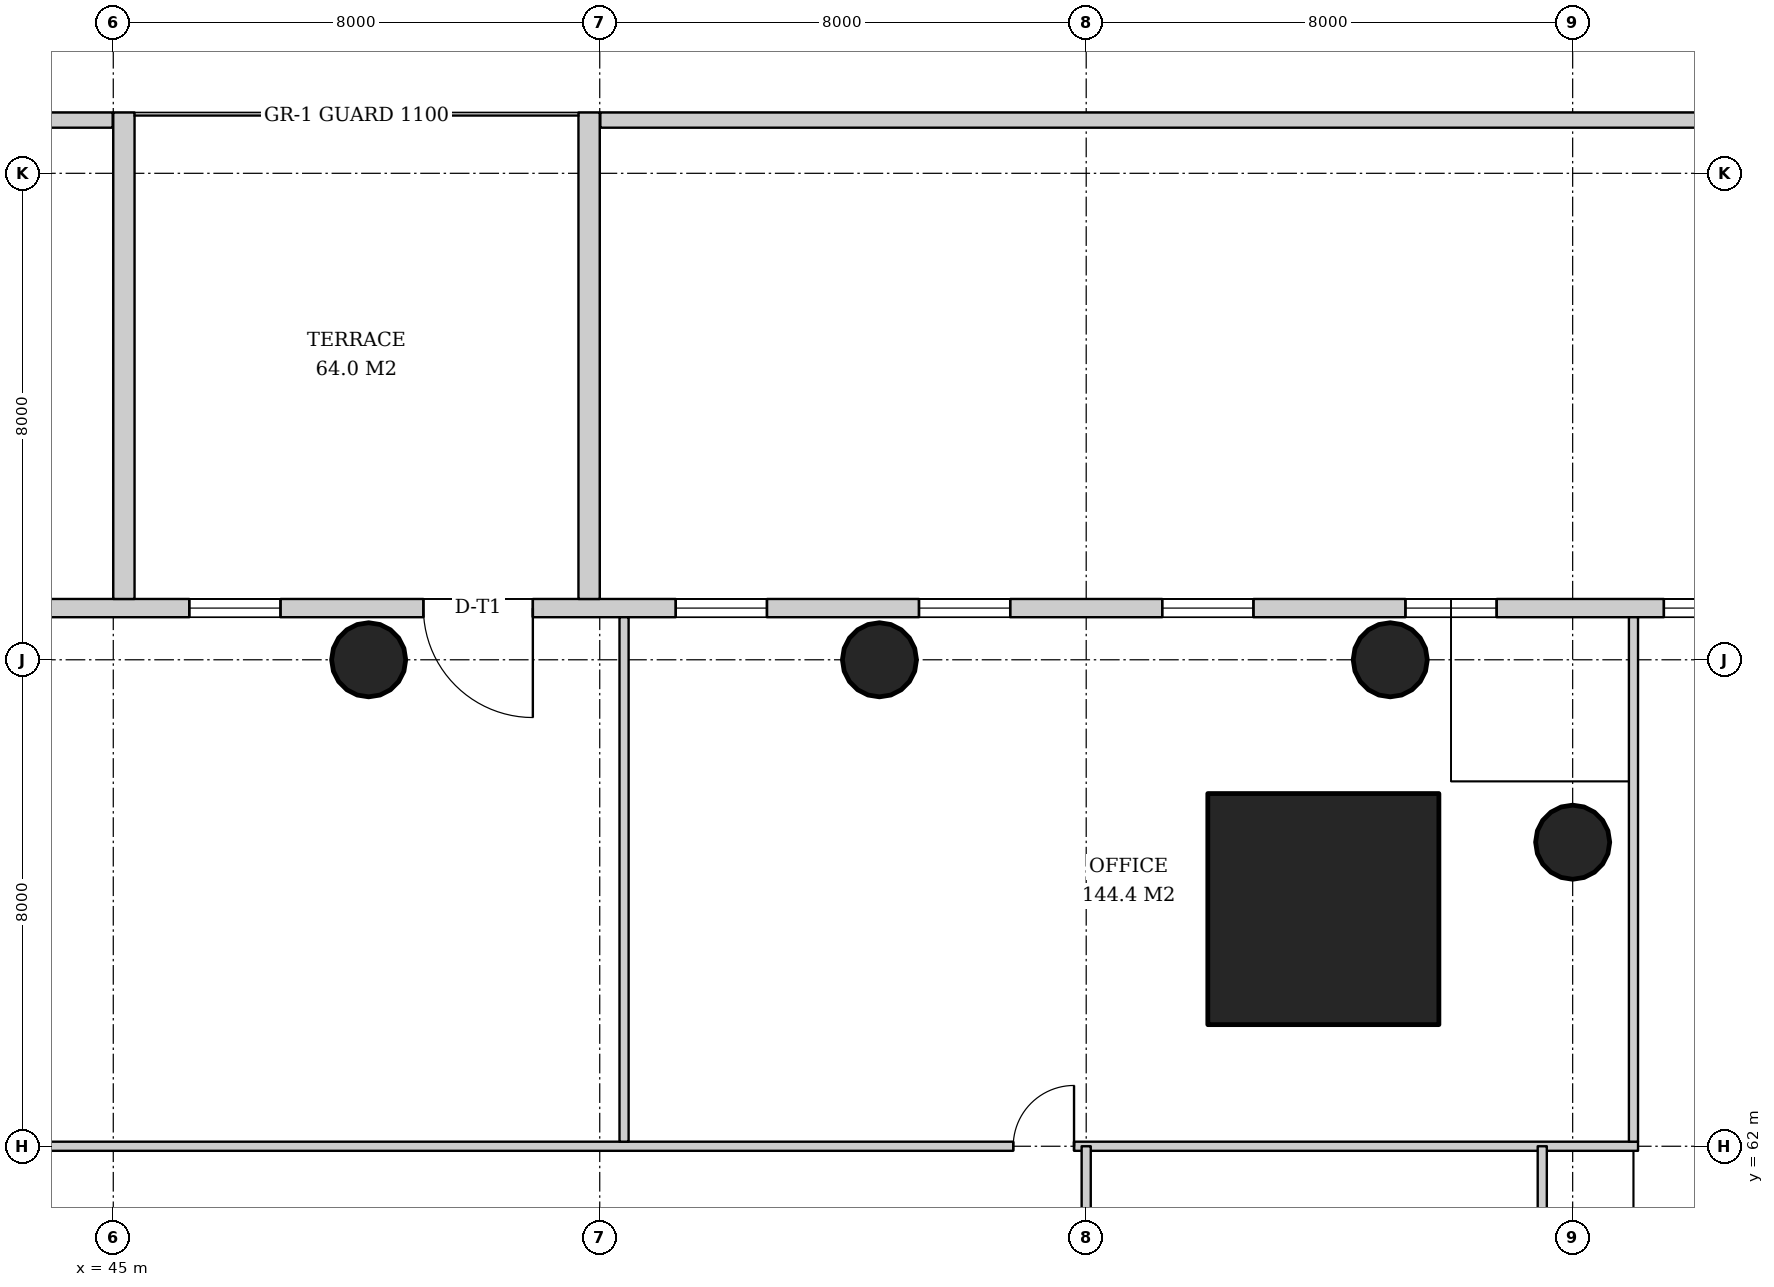
"""IFC4 building model, lengths in metres.
Left out: names, types, materials, properties, quantities, classifications, styles, units other than length and angle.
Written with IfcOpenShell. Run it as: python <this file> out.ifc"""

import sys

from ifc_helpers import new_model, si_unit, direction, frame, frame_2d, origin, origin_2d, place, context, subcontext, project, spatial, rectangle, hollow_circle, extrude, element, fill, save


model = new_model("IFC4")
c1 = context("Model", 3, precision=1e-05, world=origin(), true_north=direction((0.0, 1.0)))
c2 = subcontext(c1, "Body", "Model", "MODEL_VIEW")
j1 = project(units=[si_unit("LENGTHUNIT", "METRE"), si_unit("PLANEANGLEUNIT", "RADIAN")], contexts=[c1])
p1 = place(None, origin())
s1 = spatial("IfcSite", under=j1, at=p1, CompositionType="ELEMENT")
p2 = place(p1, origin())
s2 = spatial("IfcBuilding", under=s1, at=p2, CompositionType="ELEMENT")
p3 = place(p2, frame((0.0, 0.0, 16.0)))
s3 = spatial("IfcBuildingStorey", under=s2, at=p3, CompositionType="ELEMENT", Elevation=16.0)
p4 = place(p3, frame((64.9, 65.9, 0.0), z_axis=(0.0, 0.0, 1.0), x_axis=(1.0, 0.0, 0.0)))
e1 = element("IfcColumn", 1, at=p4, inside=s3, PredefinedType="COLUMN", context=c2, shape_type="SweptSolid", body=[
    extrude(rectangle(XDim=3.8, YDim=3.8, at=origin_2d()), origin(), (0.0, 0.0, 1.0), 5.0),
])
for number, where, z_axis, x_axis in (
    (2, (69.0, 67.0, 0.0), (0.0, 0.0, 1.0), (1.0, 0.0, 0.0)),
    (3, (66.0, 70.0, 0.0), (0.0, 0.0, 1.0), (1.0, 0.0, 0.0)),
    (4, (57.6, 70.0, 0.0), (0.0, 0.0, 1.0), (1.0, 0.0, 0.0)),
    (5, (49.2, 70.0, 0.0), (0.0, 0.0, 1.0), (1.0, 0.0, 0.0)),
):
    element("IfcColumn", number, at=place(p3, frame(where, z_axis=z_axis, x_axis=x_axis)), inside=s3, PredefinedType="COLUMN", context=c2, shape_type="SweptSolid", body=[
        extrude(hollow_circle(Radius=0.61, WallThickness=0.04, at=origin_2d()), origin(), (0.0, 0.0, 1.0), 5.0),
    ])
p5 = place(p3, frame((78.0, 70.85, 0.0), z_axis=(0.0, 0.0, 1.0), x_axis=(-1.0, 0.0, 0.0)))
e6 = element("IfcWall", 6, at=p5, inside=s3, PredefinedType="SOLIDWALL", context=c2, shape_type="SweptSolid", body=[
    extrude(rectangle(XDim=58.0, YDim=0.3, at=frame_2d((29.0, 0.0))), origin(), (0.0, 0.0, 1.0), 4.7),
])
p6 = place(p5, frame((1.5, 0.0, 0.9)))
e7 = element("IfcOpeningElement", 7, at=p6, cuts=e6, PredefinedType="OPENING", context=c2, shape_type="SweptSolid", body=[
    extrude(rectangle(XDim=1.5, YDim=3.2, at=frame_2d((0.75, 1.6))), frame((0.0, 0.16, 0.0), z_axis=(0.0, -1.0, 0.0), x_axis=(1.0, 0.0, 0.0)), (0.0, 0.0, 1.0), 0.32),
])
p7 = place(p5, frame((6.0, 0.0, 0.9)))
e8 = element("IfcOpeningElement", 8, at=p7, cuts=e6, PredefinedType="OPENING", context=c2, shape_type="SweptSolid", body=[
    extrude(rectangle(XDim=1.5, YDim=3.2, at=frame_2d((0.75, 1.6))), frame((0.0, 0.16, 0.0), z_axis=(0.0, -1.0, 0.0), x_axis=(1.0, 0.0, 0.0)), (0.0, 0.0, 1.0), 0.32),
])
p8 = place(p5, frame((10.25, 0.0, 0.9)))
e9 = element("IfcOpeningElement", 9, at=p8, cuts=e6, PredefinedType="OPENING", context=c2, shape_type="SweptSolid", body=[
    extrude(rectangle(XDim=1.5, YDim=3.2, at=frame_2d((0.75, 1.6))), frame((0.0, 0.16, 0.0), z_axis=(0.0, -1.0, 0.0), x_axis=(1.0, 0.0, 0.0)), (0.0, 0.0, 1.0), 0.32),
])
p9 = place(p5, frame((14.25, 0.0, 0.9)))
e10 = element("IfcOpeningElement", 10, at=p9, cuts=e6, PredefinedType="OPENING", context=c2, shape_type="SweptSolid", body=[
    extrude(rectangle(XDim=1.5, YDim=3.2, at=frame_2d((0.75, 1.6))), frame((0.0, 0.16, 0.0), z_axis=(0.0, -1.0, 0.0), x_axis=(1.0, 0.0, 0.0)), (0.0, 0.0, 1.0), 0.32),
])
p10 = place(p5, frame((18.25, 0.0, 0.9)))
e11 = element("IfcOpeningElement", 11, at=p10, cuts=e6, PredefinedType="OPENING", context=c2, shape_type="SweptSolid", body=[
    extrude(rectangle(XDim=1.5, YDim=3.2, at=frame_2d((0.75, 1.6))), frame((0.0, 0.16, 0.0), z_axis=(0.0, -1.0, 0.0), x_axis=(1.0, 0.0, 0.0)), (0.0, 0.0, 1.0), 0.32),
])
p11 = place(p5, frame((22.25, 0.0, 0.9)))
e12 = element("IfcOpeningElement", 12, at=p11, cuts=e6, PredefinedType="OPENING", context=c2, shape_type="SweptSolid", body=[
    extrude(rectangle(XDim=1.5, YDim=3.2, at=frame_2d((0.75, 1.6))), frame((0.0, 0.16, 0.0), z_axis=(0.0, -1.0, 0.0), x_axis=(1.0, 0.0, 0.0)), (0.0, 0.0, 1.0), 0.32),
])
p12 = place(p5, frame((26.1, 0.0, 0.0)))
e13 = element("IfcOpeningElement", 13, at=p12, cuts=e6, PredefinedType="OPENING", context=c2, shape_type="SweptSolid", body=[
    extrude(rectangle(XDim=1.8, YDim=2.4, at=frame_2d((0.9, 1.2))), frame((0.0, 0.16, 0.0), z_axis=(0.0, -1.0, 0.0), x_axis=(1.0, 0.0, 0.0)), (0.0, 0.0, 1.0), 0.32),
])
p13 = place(p5, frame((30.25, 0.0, 0.9)))
e14 = element("IfcOpeningElement", 14, at=p13, cuts=e6, PredefinedType="OPENING", context=c2, shape_type="SweptSolid", body=[
    extrude(rectangle(XDim=1.5, YDim=3.2, at=frame_2d((0.75, 1.6))), frame((0.0, 0.16, 0.0), z_axis=(0.0, -1.0, 0.0), x_axis=(1.0, 0.0, 0.0)), (0.0, 0.0, 1.0), 0.32),
])
p14 = place(p5, frame((34.25, 0.0, 0.9)))
e15 = element("IfcOpeningElement", 15, at=p14, cuts=e6, PredefinedType="OPENING", context=c2, shape_type="SweptSolid", body=[
    extrude(rectangle(XDim=1.5, YDim=3.2, at=frame_2d((0.75, 1.6))), frame((0.0, 0.16, 0.0), z_axis=(0.0, -1.0, 0.0), x_axis=(1.0, 0.0, 0.0)), (0.0, 0.0, 1.0), 0.32),
])
p15 = place(p5, frame((38.25, 0.0, 0.9)))
e16 = element("IfcOpeningElement", 16, at=p15, cuts=e6, PredefinedType="OPENING", context=c2, shape_type="SweptSolid", body=[
    extrude(rectangle(XDim=1.5, YDim=3.2, at=frame_2d((0.75, 1.6))), frame((0.0, 0.16, 0.0), z_axis=(0.0, -1.0, 0.0), x_axis=(1.0, 0.0, 0.0)), (0.0, 0.0, 1.0), 0.32),
])
p16 = place(p5, frame((42.25, 0.0, 0.9)))
e17 = element("IfcOpeningElement", 17, at=p16, cuts=e6, PredefinedType="OPENING", context=c2, shape_type="SweptSolid", body=[
    extrude(rectangle(XDim=1.5, YDim=3.2, at=frame_2d((0.75, 1.6))), frame((0.0, 0.16, 0.0), z_axis=(0.0, -1.0, 0.0), x_axis=(1.0, 0.0, 0.0)), (0.0, 0.0, 1.0), 0.32),
])
p17 = place(p5, frame((46.25, 0.0, 0.9)))
e18 = element("IfcOpeningElement", 18, at=p17, cuts=e6, PredefinedType="OPENING", context=c2, shape_type="SweptSolid", body=[
    extrude(rectangle(XDim=1.5, YDim=3.2, at=frame_2d((0.75, 1.6))), frame((0.0, 0.16, 0.0), z_axis=(0.0, -1.0, 0.0), x_axis=(1.0, 0.0, 0.0)), (0.0, 0.0, 1.0), 0.32),
])
p18 = place(p5, frame((50.5, 0.0, 0.9)))
e19 = element("IfcOpeningElement", 19, at=p18, cuts=e6, PredefinedType="OPENING", context=c2, shape_type="SweptSolid", body=[
    extrude(rectangle(XDim=1.5, YDim=3.2, at=frame_2d((0.75, 1.6))), frame((0.0, 0.16, 0.0), z_axis=(0.0, -1.0, 0.0), x_axis=(1.0, 0.0, 0.0)), (0.0, 0.0, 1.0), 0.32),
])
p19 = place(p5, frame((55.0, 0.0, 0.9)))
e20 = element("IfcOpeningElement", 20, at=p19, cuts=e6, PredefinedType="OPENING", context=c2, shape_type="SweptSolid", body=[
    extrude(rectangle(XDim=1.5, YDim=3.2, at=frame_2d((0.75, 1.6))), frame((0.0, 0.16, 0.0), z_axis=(0.0, -1.0, 0.0), x_axis=(1.0, 0.0, 0.0)), (0.0, 0.0, 1.0), 0.32),
])
for number, where, z_axis, x_axis in (
    (21, (20.0, 78.875, 0.0), (0.0, 0.0, 1.0), (1.0, 0.0, 0.0)),
    (22, (53.01, 78.875, 0.0), (0.0, 0.0, 1.0), (1.0, 0.0, 0.0)),
):
    element("IfcWall", number, at=place(p3, frame(where, z_axis=z_axis, x_axis=x_axis)), inside=s3, PredefinedType="PARAPET", context=c2, shape_type="SweptSolid", body=[
        extrude(rectangle(XDim=24.99, YDim=0.25, at=frame_2d((12.495, 0.0))), origin(), (0.0, 0.0, 1.0), 1.1),
    ])
for number, where, z_axis, x_axis in (
    (23, (45.175, 71.0, 0.0), (0.0, 0.0, 1.0), (0.0, 1.0, 0.0)),
    (24, (52.825, 71.0, 0.0), (0.0, 0.0, 1.0), (0.0, 1.0, 0.0)),
):
    element("IfcWall", number, at=place(p3, frame(where, z_axis=z_axis, x_axis=x_axis)), inside=s3, PredefinedType="PARAPET", context=c2, shape_type="SweptSolid", body=[
        extrude(rectangle(XDim=8.0, YDim=0.35, at=frame_2d((4.0, 0.0))), origin(), (0.0, 0.0, 1.0), 1.1),
    ])
p20 = place(p3, frame((19.925, 62.0, 0.0), z_axis=(0.0, 0.0, 1.0), x_axis=(1.0, 0.0, 0.0)))
e25 = element("IfcWall", 25, at=p20, inside=s3, PredefinedType="PARTITIONING", context=c2, shape_type="SweptSolid", body=[
    extrude(rectangle(XDim=50.15, YDim=0.15, at=frame_2d((25.075, 0.0))), origin(), (0.0, 0.0, 1.0), 3.688),
])
p21 = place(p20, frame((15.875, 0.0, 0.0)))
e26 = element("IfcOpeningElement", 26, at=p21, cuts=e25, PredefinedType="OPENING", context=c2, shape_type="SweptSolid", body=[
    extrude(rectangle(XDim=1.8, YDim=2.4, at=frame_2d((0.9, 1.2))), frame((0.0, 0.085, 0.0), z_axis=(0.0, -1.0, 0.0), x_axis=(1.0, 0.0, 0.0)), (0.0, 0.0, 1.0), 0.17),
])
p22 = place(p20, frame((39.875, 0.0, 0.0)))
e27 = element("IfcOpeningElement", 27, at=p22, cuts=e25, PredefinedType="OPENING", context=c2, shape_type="SweptSolid", body=[
    extrude(rectangle(XDim=1.0, YDim=2.1, at=frame_2d((0.5, 1.05))), frame((0.0, 0.085, 0.0), z_axis=(0.0, -1.0, 0.0), x_axis=(1.0, 0.0, 0.0)), (0.0, 0.0, 1.0), 0.17),
])
p23 = place(p3, frame((70.0, 62.075, 0.0), z_axis=(0.0, 0.0, 1.0), x_axis=(0.0, 1.0, 0.0)))
e28 = element("IfcWall", 28, at=p23, inside=s3, PredefinedType="PARTITIONING", context=c2, shape_type="SweptSolid", body=[
    extrude(rectangle(XDim=8.625, YDim=0.15, at=frame_2d((4.312, 0.0))), origin(), (0.0, 0.0, 1.0), 4.7),
])
p24 = place(p3, frame((53.4, 62.075, 0.0), z_axis=(0.0, 0.0, 1.0), x_axis=(0.0, 1.0, 0.0)))
e29 = element("IfcWall", 29, at=p24, inside=s3, PredefinedType="PARTITIONING", context=c2, shape_type="SweptSolid", body=[
    extrude(rectangle(XDim=8.625, YDim=0.15, at=frame_2d((4.312, 0.0))), origin(), (0.0, 0.0, 1.0), 4.1),
])
p25 = place(p3, frame((61.0, 30.0, 0.0), z_axis=(0.0, 0.0, 1.0), x_axis=(0.0, 1.0, 0.0)))
e30 = element("IfcWall", 30, at=p25, inside=s3, PredefinedType="PARTITIONING", context=c2, shape_type="SweptSolid", body=[
    extrude(rectangle(XDim=32.0, YDim=0.15, at=frame_2d((16.0, 0.0))), origin(), (0.0, 0.0, 1.0), 3.688),
])
p26 = place(p25, frame((7.5, 0.0, 0.0)))
e31 = element("IfcOpeningElement", 31, at=p26, cuts=e30, PredefinedType="OPENING", context=c2, shape_type="SweptSolid", body=[
    extrude(rectangle(XDim=1.0, YDim=2.1, at=frame_2d((0.5, 1.05))), frame((0.0, 0.085, 0.0), z_axis=(0.0, -1.0, 0.0), x_axis=(1.0, 0.0, 0.0)), (0.0, 0.0, 1.0), 0.17),
])
p27 = place(p25, frame((23.5, 0.0, 0.0)))
e32 = element("IfcOpeningElement", 32, at=p27, cuts=e30, PredefinedType="OPENING", context=c2, shape_type="SweptSolid", body=[
    extrude(rectangle(XDim=1.0, YDim=2.1, at=frame_2d((0.5, 1.05))), frame((0.0, 0.085, 0.0), z_axis=(0.0, -1.0, 0.0), x_axis=(1.0, 0.0, 0.0)), (0.0, 0.0, 1.0), 0.17),
])
p28 = place(p3, frame((68.5, 59.209, 0.0), z_axis=(0.0, 0.0, 1.0), x_axis=(0.0, 1.0, 0.0)))
e33 = element("IfcWall", 33, at=p28, inside=s3, PredefinedType="PARTITIONING", context=c2, shape_type="SweptSolid", body=[
    extrude(rectangle(XDim=2.791, YDim=0.15, at=frame_2d((1.395, 0.0))), origin(), (0.0, 0.0, 1.0), 3.886),
])
p29 = place(p7, origin())
e34 = element("IfcWindow", 34, at=p29, inside=s3, PartitioningType="SINGLE_PANEL", PredefinedType="WINDOW", context=c2, shape_type="SweptSolid", body=[
    extrude(rectangle(XDim=1.5, YDim=3.2, at=frame_2d((0.75, 1.6))), frame((0.0, 0.03, 0.0), z_axis=(0.0, -1.0, 0.0), x_axis=(1.0, 0.0, 0.0)), (0.0, 0.0, 1.0), 0.06),
])
fill(e8, e34)
p30 = place(p8, origin())
e35 = element("IfcWindow", 35, at=p30, inside=s3, PartitioningType="SINGLE_PANEL", PredefinedType="WINDOW", context=c2, shape_type="SweptSolid", body=[
    extrude(rectangle(XDim=1.5, YDim=3.2, at=frame_2d((0.75, 1.6))), frame((0.0, 0.03, 0.0), z_axis=(0.0, -1.0, 0.0), x_axis=(1.0, 0.0, 0.0)), (0.0, 0.0, 1.0), 0.06),
])
fill(e9, e35)
p31 = place(p9, origin())
e36 = element("IfcWindow", 36, at=p31, inside=s3, PartitioningType="SINGLE_PANEL", PredefinedType="WINDOW", context=c2, shape_type="SweptSolid", body=[
    extrude(rectangle(XDim=1.5, YDim=3.2, at=frame_2d((0.75, 1.6))), frame((0.0, 0.03, 0.0), z_axis=(0.0, -1.0, 0.0), x_axis=(1.0, 0.0, 0.0)), (0.0, 0.0, 1.0), 0.06),
])
fill(e10, e36)
p32 = place(p10, origin())
e37 = element("IfcWindow", 37, at=p32, inside=s3, PartitioningType="SINGLE_PANEL", PredefinedType="WINDOW", context=c2, shape_type="SweptSolid", body=[
    extrude(rectangle(XDim=1.5, YDim=3.2, at=frame_2d((0.75, 1.6))), frame((0.0, 0.03, 0.0), z_axis=(0.0, -1.0, 0.0), x_axis=(1.0, 0.0, 0.0)), (0.0, 0.0, 1.0), 0.06),
])
fill(e11, e37)
p33 = place(p11, origin())
e38 = element("IfcWindow", 38, at=p33, inside=s3, PartitioningType="SINGLE_PANEL", PredefinedType="WINDOW", context=c2, shape_type="SweptSolid", body=[
    extrude(rectangle(XDim=1.5, YDim=3.2, at=frame_2d((0.75, 1.6))), frame((0.0, 0.03, 0.0), z_axis=(0.0, -1.0, 0.0), x_axis=(1.0, 0.0, 0.0)), (0.0, 0.0, 1.0), 0.06),
])
fill(e12, e38)
p34 = place(p12, origin())
e39 = element("IfcDoor", 39, at=p34, inside=s3, OperationType="DOUBLE_DOOR_SINGLE_SWING", PredefinedType="DOOR", context=c2, shape_type="SweptSolid", body=[
    extrude(rectangle(XDim=1.8, YDim=2.4, at=frame_2d((0.9, 1.2))), frame((0.0, 0.025, 0.0), z_axis=(0.0, -1.0, 0.0), x_axis=(1.0, 0.0, 0.0)), (0.0, 0.0, 1.0), 0.05),
])
fill(e13, e39)
p35 = place(p13, origin())
e40 = element("IfcWindow", 40, at=p35, inside=s3, PartitioningType="SINGLE_PANEL", PredefinedType="WINDOW", context=c2, shape_type="SweptSolid", body=[
    extrude(rectangle(XDim=1.5, YDim=3.2, at=frame_2d((0.75, 1.6))), frame((0.0, 0.03, 0.0), z_axis=(0.0, -1.0, 0.0), x_axis=(1.0, 0.0, 0.0)), (0.0, 0.0, 1.0), 0.06),
])
fill(e14, e40)
p36 = place(p22, origin())
e41 = element("IfcDoor", 41, at=p36, inside=s3, OperationType="SINGLE_SWING_RIGHT", PredefinedType="DOOR", context=c2, shape_type="SweptSolid", body=[
    extrude(rectangle(XDim=1.0, YDim=2.1, at=frame_2d((0.5, 1.05))), frame((0.0, 0.025, 0.0), z_axis=(0.0, -1.0, 0.0), x_axis=(1.0, 0.0, 0.0)), (0.0, 0.0, 1.0), 0.05),
])
fill(e27, e41)
save(model, sys.argv[1])
